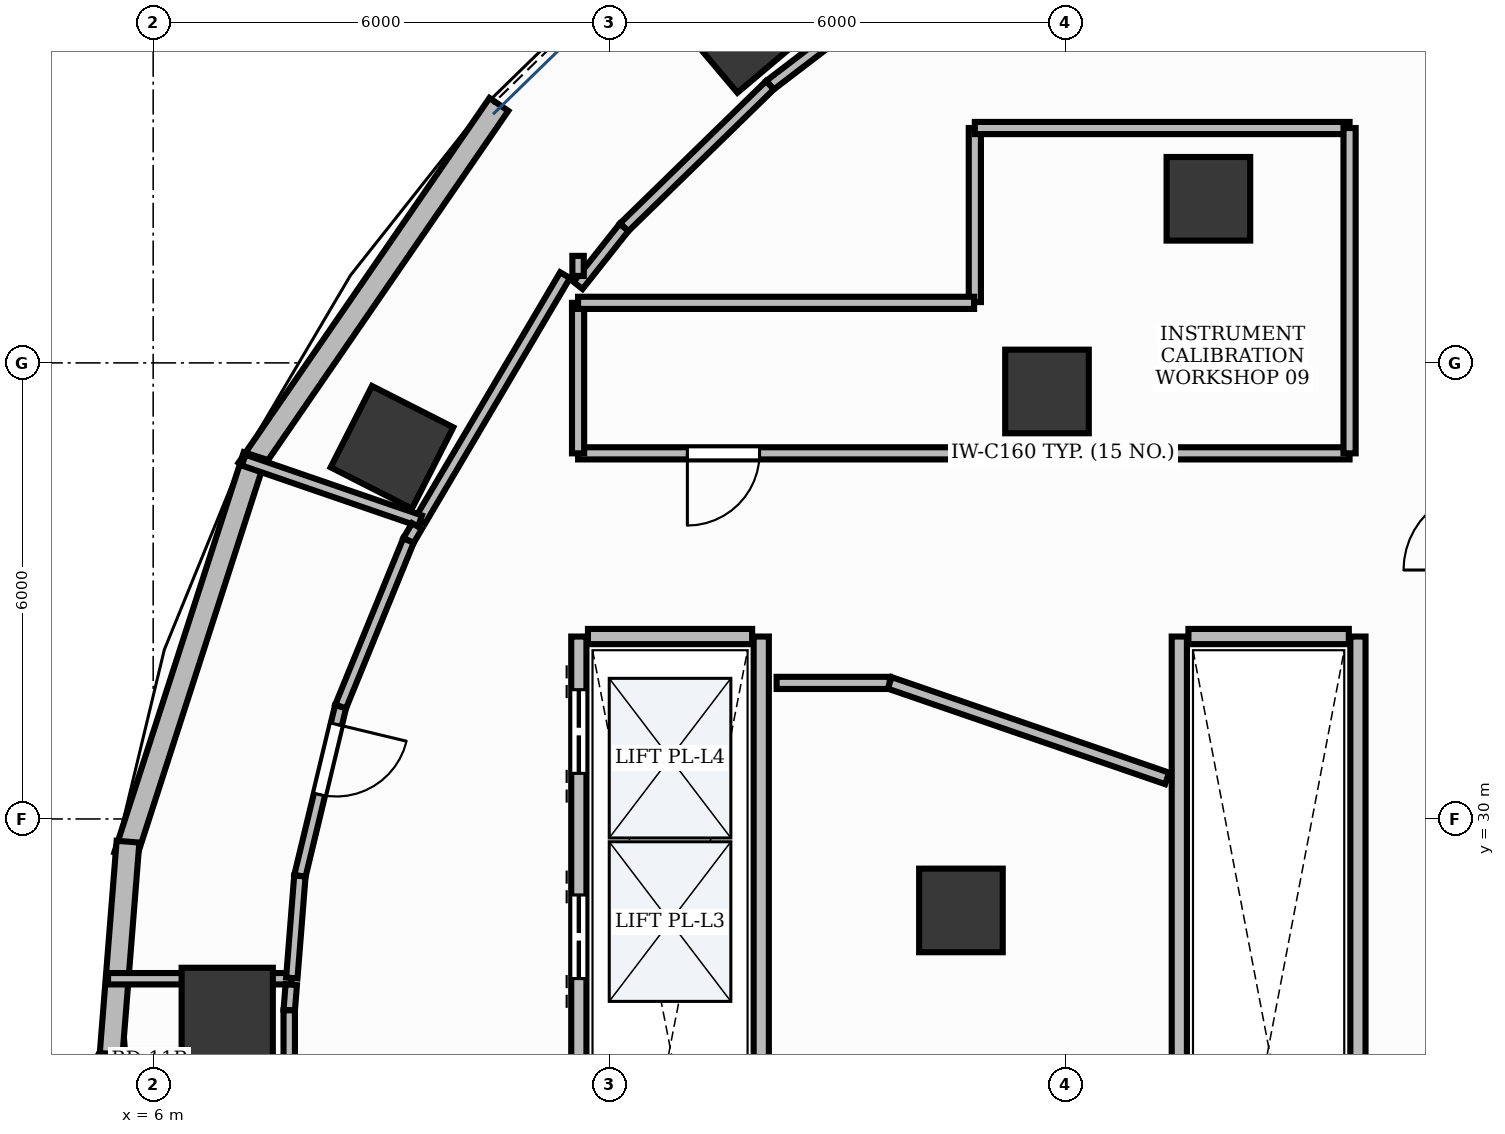
"""IFC4 building model, lengths in metres.
Left out: names, types, materials, properties, quantities, classifications, styles, units other than length and angle.
Written with IfcOpenShell. Run it as: python <this file> out.ifc"""

import sys

from ifc_helpers import new_model, si_unit, direction, frame, frame_2d, origin, origin_2d, place, context, subcontext, project, spatial, rectangle, extrude, element, fill, save


model = new_model("IFC4")
c1 = context("Model", 3, precision=1e-05, world=origin(), true_north=direction((0.0, 1.0)))
c2 = subcontext(c1, "Body", "Model", "MODEL_VIEW")
j1 = project(units=[si_unit("LENGTHUNIT", "METRE"), si_unit("PLANEANGLEUNIT", "RADIAN")], contexts=[c1])
p1 = place(None, origin())
s1 = spatial("IfcSite", under=j1, at=p1, CompositionType="ELEMENT")
p2 = place(p1, origin())
s2 = spatial("IfcBuilding", under=s1, at=p2, CompositionType="ELEMENT")
p3 = place(p2, frame((0.0, 0.0, 123.6)))
s3 = spatial("IfcBuildingStorey", under=s2, at=p3, CompositionType="ELEMENT", Elevation=123.6)
p4 = place(p3, frame((13.758, 40.4, -0.0), z_axis=(0.0, 0.0, 1.0), x_axis=(0.764246456939, 0.644924300253, 0.0)))
e1 = element("IfcColumn", 1, at=p4, inside=s3, PredefinedType="COLUMN", context=c2, shape_type="SweptSolid", body=[
    extrude(rectangle(XDim=1.2, YDim=1.2, at=origin_2d()), origin(), (0.0, 0.0, 1.0), 3.901),
])
p5 = place(p3, frame((19.883, 38.159, -0.0), z_axis=(0.0, 0.0, 1.0), x_axis=(1.0, 0.0, 0.0)))
e2 = element("IfcColumn", 2, at=p5, inside=s3, PredefinedType="COLUMN", context=c2, shape_type="SweptSolid", body=[
    extrude(rectangle(XDim=1.1, YDim=1.1, at=origin_2d()), origin(), (0.0, 0.0, 1.0), 3.901),
])
p6 = place(p3, frame((9.142, 34.889, -0.0), z_axis=(0.0, 0.0, 1.0), x_axis=(0.453057191132, 0.891481453292, 0.0)))
e3 = element("IfcColumn", 3, at=p6, inside=s3, PredefinedType="COLUMN", context=c2, shape_type="SweptSolid", body=[
    extrude(rectangle(XDim=1.2, YDim=1.2, at=origin_2d()), origin(), (0.0, 0.0, 1.0), 3.901),
])
p7 = place(p3, frame((17.759, 35.624, -0.0), z_axis=(0.0, 0.0, 1.0), x_axis=(1.0, 0.0, 0.0)))
e4 = element("IfcColumn", 4, at=p7, inside=s3, PredefinedType="COLUMN", context=c2, shape_type="SweptSolid", body=[
    extrude(rectangle(XDim=1.1, YDim=1.1, at=origin_2d()), origin(), (0.0, 0.0, 1.0), 3.901),
])
p8 = place(p3, frame((6.974, 27.442, -0.0), z_axis=(0.0, 0.0, 1.0), x_axis=(0.0, 1.0, 0.0)))
e5 = element("IfcColumn", 5, at=p8, inside=s3, PredefinedType="COLUMN", context=c2, shape_type="SweptSolid", body=[
    extrude(rectangle(XDim=1.2, YDim=1.2, at=origin_2d()), origin(), (0.0, 0.0, 1.0), 3.901),
])
p9 = place(p3, frame((16.627, 28.797, -0.0), z_axis=(0.0, 0.0, 1.0), x_axis=(1.0, 0.0, 0.0)))
e6 = element("IfcColumn", 6, at=p9, inside=s3, PredefinedType="COLUMN", context=c2, shape_type="SweptSolid", body=[
    extrude(rectangle(XDim=1.1, YDim=1.1, at=origin_2d()), origin(), (0.0, 0.0, 1.0), 3.901),
])
p10 = place(p3, frame((5.469, 27.073, 0.0), z_axis=(0.0, 0.0, 1.0), x_axis=(0.079056321743, -0.996870151019, 0.0)))
e7 = element("IfcWall", 7, at=p10, inside=s3, PredefinedType="STANDARD", context=c2, shape_type="SweptSolid", body=[
    extrude(rectangle(XDim=2.761, YDim=0.3, at=frame_2d((1.38, 0.0))), origin(), (0.0, 0.0, 1.0), 3.9),
])
p11 = place(p10, frame((0.83, 0.0, 0.0)))
e8 = element("IfcOpeningElement", 8, at=p11, cuts=e7, PredefinedType="OPENING", context=c2, shape_type="SweptSolid", body=[
    extrude(rectangle(XDim=1.1, YDim=2.15, at=frame_2d((0.55, 1.075))), frame((0.0, 0.165, 0.0), z_axis=(0.0, -1.0, 0.0), x_axis=(1.0, 0.0, 0.0)), (0.0, 0.0, 1.0), 0.33),
])
p12 = place(p3, frame((10.548, 39.4, 0.0), z_axis=(0.0, 0.0, 1.0), x_axis=(-0.566825798999, -0.823837674296, 0.0)))
e9 = element("IfcWall", 9, at=p12, inside=s3, PredefinedType="STANDARD", context=c2, shape_type="SweptSolid", body=[
    extrude(rectangle(XDim=5.826, YDim=0.3, at=frame_2d((2.913, 0.0))), origin(), (0.0, 0.0, 1.0), 3.47),
])
p13 = place(p3, frame((7.334, 34.779, 0.0), z_axis=(0.0, 0.0, 1.0), x_axis=(-0.307599470659, -0.951515930319, 0.0)))
e10 = element("IfcWall", 10, at=p13, inside=s3, PredefinedType="STANDARD", context=c2, shape_type="SweptSolid", body=[
    extrude(rectangle(XDim=5.534, YDim=0.3, at=frame_2d((2.767, 0.0))), origin(), (0.0, 0.0, 1.0), 3.47),
])
p14 = place(p3, frame((5.669, 29.701, 0.0), z_axis=(0.0, 0.0, 1.0), x_axis=(-0.079062676622, -0.996869647028, 0.0)))
e11 = element("IfcWall", 11, at=p14, inside=s3, PredefinedType="STANDARD", context=c2, shape_type="SweptSolid", body=[
    extrude(rectangle(XDim=2.801, YDim=0.3, at=frame_2d((1.4, 0.0))), origin(), (0.0, 0.0, 1.0), 3.47),
])
p15 = place(p3, frame((11.6, 21.6, 0.0), z_axis=(0.0, 0.0, 1.0), x_axis=(0.0, 1.0, 0.0)))
e12 = element("IfcWall", 12, at=p15, inside=s3, PredefinedType="PARTITIONING", context=c2, shape_type="SweptSolid", body=[
    extrude(rectangle(XDim=10.8, YDim=0.2, at=frame_2d((5.4, 0.0))), origin(), (0.0, 0.0, 1.0), 2.91),
])
p16 = place(p15, frame((0.9, 0.0, 0.0)))
e13 = element("IfcOpeningElement", 13, at=p16, cuts=e12, PredefinedType="OPENING", context=c2, shape_type="SweptSolid", body=[
    extrude(rectangle(XDim=1.1, YDim=2.2, at=frame_2d((0.55, 1.1))), frame((0.0, 0.115, 0.0), z_axis=(0.0, -1.0, 0.0), x_axis=(1.0, 0.0, 0.0)), (0.0, 0.0, 1.0), 0.23),
])
p17 = place(p15, frame((3.6, 0.0, 0.0)))
e14 = element("IfcOpeningElement", 14, at=p17, cuts=e12, PredefinedType="OPENING", context=c2, shape_type="SweptSolid", body=[
    extrude(rectangle(XDim=1.1, YDim=2.2, at=frame_2d((0.55, 1.1))), frame((0.0, 0.115, 0.0), z_axis=(0.0, -1.0, 0.0), x_axis=(1.0, 0.0, 0.0)), (0.0, 0.0, 1.0), 0.23),
])
p18 = place(p15, frame((6.3, 0.0, 0.0)))
e15 = element("IfcOpeningElement", 15, at=p18, cuts=e12, PredefinedType="OPENING", context=c2, shape_type="SweptSolid", body=[
    extrude(rectangle(XDim=1.1, YDim=2.2, at=frame_2d((0.55, 1.1))), frame((0.0, 0.115, 0.0), z_axis=(0.0, -1.0, 0.0), x_axis=(1.0, 0.0, 0.0)), (0.0, 0.0, 1.0), 0.23),
])
p19 = place(p15, frame((9.0, 0.0, 0.0)))
e16 = element("IfcOpeningElement", 16, at=p19, cuts=e12, PredefinedType="OPENING", context=c2, shape_type="SweptSolid", body=[
    extrude(rectangle(XDim=1.1, YDim=2.2, at=frame_2d((0.55, 1.1))), frame((0.0, 0.115, 0.0), z_axis=(0.0, -1.0, 0.0), x_axis=(1.0, 0.0, 0.0)), (0.0, 0.0, 1.0), 0.23),
])
p20 = place(p3, frame((14.0, 21.6, 0.0), z_axis=(0.0, 0.0, 1.0), x_axis=(0.0, 1.0, 0.0)))
e17 = element("IfcWall", 17, at=p20, inside=s3, PredefinedType="PARTITIONING", context=c2, shape_type="SweptSolid", body=[
    extrude(rectangle(XDim=10.8, YDim=0.2, at=frame_2d((5.4, 0.0))), origin(), (0.0, 0.0, 1.0), 2.91),
])
p21 = place(p3, frame((11.72, 32.4, 0.0), z_axis=(0.0, 0.0, 1.0), x_axis=(1.0, 0.0, 0.0)))
e18 = element("IfcWall", 18, at=p21, inside=s3, PredefinedType="PARTITIONING", context=c2, shape_type="SweptSolid", body=[
    extrude(rectangle(XDim=2.16, YDim=0.2, at=frame_2d((1.08, 0.0))), origin(), (0.0, 0.0, 1.0), 2.91),
])
for number, where, z_axis, x_axis in (
    (19, (19.5, 21.6, 0.0), (0.0, 0.0, 1.0), (0.0, 1.0, 0.0)),
    (20, (21.85, 21.6, 0.0), (0.0, 0.0, 1.0), (0.0, 1.0, 0.0)),
):
    element("IfcWall", number, at=place(p3, frame(where, z_axis=z_axis, x_axis=x_axis)), inside=s3, PredefinedType="PARTITIONING", context=c2, shape_type="SweptSolid", body=[
        extrude(rectangle(XDim=10.8, YDim=0.2, at=frame_2d((5.4, 0.0))), origin(), (0.0, 0.0, 1.0), 2.91),
    ])
p22 = place(p3, frame((19.62, 32.4, 0.0), z_axis=(0.0, 0.0, 1.0), x_axis=(1.0, 0.0, 0.0)))
e21 = element("IfcWall", 21, at=p22, inside=s3, PredefinedType="PARTITIONING", context=c2, shape_type="SweptSolid", body=[
    extrude(rectangle(XDim=2.11, YDim=0.2, at=frame_2d((1.055, 0.0))), origin(), (0.0, 0.0, 1.0), 2.91),
])
p23 = place(p3, frame((21.74, 34.81, 0.0), z_axis=(0.0, 0.0, 1.0), x_axis=(-1.0, 0.0, 0.0)))
e22 = element("IfcWall", 22, at=p23, inside=s3, PredefinedType="PARTITIONING", context=c2, shape_type="SweptSolid", body=[
    extrude(rectangle(XDim=10.15, YDim=0.16, at=frame_2d((5.075, 0.0))), origin(), (0.0, 0.0, 1.0), 2.91),
])
p24 = place(p23, frame((7.762, 0.0, 0.0)))
e23 = element("IfcOpeningElement", 23, at=p24, cuts=e22, PredefinedType="OPENING", context=c2, shape_type="SweptSolid", body=[
    extrude(rectangle(XDim=0.95, YDim=2.15, at=frame_2d((0.475, 1.075))), frame((0.0, 0.095, 0.0), z_axis=(0.0, -1.0, 0.0), x_axis=(1.0, 0.0, 0.0)), (0.0, 0.0, 1.0), 0.19),
])
p25 = place(p3, frame((8.466, 31.479, 0.0), z_axis=(0.0, 0.0, 1.0), x_axis=(-0.233675196412, -0.972314713754, 0.0)))
e24 = element("IfcWall", 24, at=p25, inside=s3, PredefinedType="PARTITIONING", context=c2, shape_type="SweptSolid", body=[
    extrude(rectangle(XDim=2.291, YDim=0.15, at=frame_2d((1.146, 0.0))), origin(), (0.0, 0.0, 1.0), 2.91),
])
p26 = place(p25, frame((0.24, 0.0, 0.0)))
e25 = element("IfcOpeningElement", 25, at=p26, cuts=e24, PredefinedType="OPENING", context=c2, shape_type="SweptSolid", body=[
    extrude(rectangle(XDim=0.95, YDim=2.15, at=frame_2d((0.475, 1.075))), frame((0.0, 0.09, 0.0), z_axis=(0.0, -1.0, 0.0), x_axis=(1.0, 0.0, 0.0)), (0.0, 0.0, 1.0), 0.18),
])
p27 = place(p3, frame((14.202, 31.79, 0.0), z_axis=(0.0, 0.0, 1.0), x_axis=(1.0, 0.0, 0.0)))
e26 = element("IfcWall", 26, at=p27, inside=s3, PredefinedType="PARTITIONING", context=c2, shape_type="SweptSolid", body=[
    extrude(rectangle(XDim=1.489, YDim=0.16, at=frame_2d((0.744, 0.0))), origin(), (0.0, 0.0, 1.0), 2.91),
])
p28 = place(p3, frame((15.69, 31.79, 0.0), z_axis=(0.0, 0.0, 1.0), x_axis=(0.945518754025, -0.32556763627, 0.0)))
e27 = element("IfcWall", 27, at=p28, inside=s3, PredefinedType="PARTITIONING", context=c2, shape_type="SweptSolid", body=[
    extrude(rectangle(XDim=3.86, YDim=0.16, at=frame_2d((1.93, 0.0))), origin(), (0.0, 0.0, 1.0), 2.91),
])
p29 = place(p3, frame((5.406, 27.898, 0.0), z_axis=(0.0, 0.0, 1.0), x_axis=(1.0, 0.0, 0.0)))
e28 = element("IfcWall", 28, at=p29, inside=s3, PredefinedType="PARTITIONING", context=c2, shape_type="SweptSolid", body=[
    extrude(rectangle(XDim=2.417, YDim=0.15, at=frame_2d((1.208, 0.0))), origin(), (0.0, 0.0, 1.0), 2.91),
])
p30 = place(p3, frame((7.817, 27.82, 0.0), z_axis=(0.0, 0.0, 1.0), x_axis=(-0.078910750646, -0.996881684771, 0.0)))
e29 = element("IfcWall", 29, at=p30, inside=s3, PredefinedType="PARTITIONING", context=c2, shape_type="SweptSolid", body=[
    extrude(rectangle(XDim=0.337, YDim=0.15, at=frame_2d((0.168, 0.0))), origin(), (0.0, 0.0, 1.0), 2.91),
])
p31 = place(p3, frame((7.79, 27.483, 0.0), z_axis=(0.0, 0.0, 1.0), x_axis=(0.0, -1.0, 0.0)))
e30 = element("IfcWall", 30, at=p31, inside=s3, PredefinedType="PARTITIONING", context=c2, shape_type="SweptSolid", body=[
    extrude(rectangle(XDim=0.966, YDim=0.15, at=frame_2d((0.483, 0.0))), origin(), (0.0, 0.0, 1.0), 2.91),
])
p32 = place(p3, frame((16.339, 41.354, 0.0), z_axis=(0.0, 0.0, 1.0), x_axis=(-0.794513779695, -0.607246122981, 0.0)))
e31 = element("IfcWall", 31, at=p32, inside=s3, PredefinedType="PARTITIONING", context=c2, shape_type="SweptSolid", body=[
    extrude(rectangle(XDim=2.799, YDim=0.15, at=frame_2d((1.399, 0.0))), origin(), (0.0, 0.0, 1.0), 2.91),
])
p33 = place(p3, frame((14.114, 39.653, 0.0), z_axis=(0.0, 0.0, 1.0), x_axis=(-0.716161838398, -0.697934252794, 0.0)))
e32 = element("IfcWall", 32, at=p33, inside=s3, PredefinedType="PARTITIONING", context=c2, shape_type="SweptSolid", body=[
    extrude(rectangle(XDim=2.679, YDim=0.15, at=frame_2d((1.339, 0.0))), origin(), (0.0, 0.0, 1.0), 2.91),
])
p34 = place(p3, frame((12.195, 37.782, 0.0), z_axis=(0.0, 0.0, 1.0), x_axis=(-0.621081637991, -0.783745876513, 0.0)))
e33 = element("IfcWall", 33, at=p34, inside=s3, PredefinedType="PARTITIONING", context=c2, shape_type="SweptSolid", body=[
    extrude(rectangle(XDim=0.974, YDim=0.15, at=frame_2d((0.487, 0.0))), origin(), (0.0, 0.0, 1.0), 2.91),
])
p35 = place(p3, frame((11.59, 37.144, 0.0), z_axis=(0.0, 0.0, 1.0), x_axis=(0.0, 1.0, 0.0)))
e34 = element("IfcWall", 34, at=p35, inside=s3, PredefinedType="PARTITIONING", context=c2, shape_type="SweptSolid", body=[
    extrude(rectangle(XDim=0.264, YDim=0.15, at=frame_2d((0.132, 0.0))), origin(), (0.0, 0.0, 1.0), 2.91),
])
p36 = place(p3, frame((11.419, 37.154, 0.0), z_axis=(0.0, 0.0, 1.0), x_axis=(-0.508216412194, -0.861229399392, 0.0)))
e35 = element("IfcWall", 35, at=p36, inside=s3, PredefinedType="PARTITIONING", context=c2, shape_type="SweptSolid", body=[
    extrude(rectangle(XDim=3.753, YDim=0.15, at=frame_2d((1.876, 0.0))), origin(), (0.0, 0.0, 1.0), 2.91),
])
p37 = place(p3, frame((9.511, 33.922, 0.0), z_axis=(0.0, 0.0, 1.0), x_axis=(-0.945502944909, 0.325613545737, 0.0)))
e36 = element("IfcWall", 36, at=p37, inside=s3, PredefinedType="PARTITIONING", context=c2, shape_type="SweptSolid", body=[
    extrude(rectangle(XDim=2.454, YDim=0.15, at=frame_2d((1.227, 0.0))), origin(), (0.0, 0.0, 1.0), 2.91),
])
p38 = place(p3, frame((16.81, 36.8, 0.0), z_axis=(0.0, 0.0, 1.0), x_axis=(0.0, 1.0, 0.0)))
e37 = element("IfcWall", 37, at=p38, inside=s3, PredefinedType="PARTITIONING", context=c2, shape_type="SweptSolid", body=[
    extrude(rectangle(XDim=2.29, YDim=0.16, at=frame_2d((1.145, 0.0))), origin(), (0.0, 0.0, 1.0), 2.91),
])
p39 = place(p3, frame((16.81, 39.09, 0.0), z_axis=(0.0, 0.0, 1.0), x_axis=(1.0, 0.0, 0.0)))
e38 = element("IfcWall", 38, at=p39, inside=s3, PredefinedType="PARTITIONING", context=c2, shape_type="SweptSolid", body=[
    extrude(rectangle(XDim=4.93, YDim=0.16, at=frame_2d((2.465, 0.0))), origin(), (0.0, 0.0, 1.0), 2.91),
])
p40 = place(p3, frame((21.74, 39.09, 0.0), z_axis=(0.0, 0.0, 1.0), x_axis=(0.0, -1.0, 0.0)))
e39 = element("IfcWall", 39, at=p40, inside=s3, PredefinedType="PARTITIONING", context=c2, shape_type="SweptSolid", body=[
    extrude(rectangle(XDim=4.28, YDim=0.16, at=frame_2d((2.14, 0.0))), origin(), (0.0, 0.0, 1.0), 2.91),
])
p41 = place(p3, frame((11.59, 34.81, 0.0), z_axis=(0.0, 0.0, 1.0), x_axis=(0.0, 1.0, 0.0)))
e40 = element("IfcWall", 40, at=p41, inside=s3, PredefinedType="PARTITIONING", context=c2, shape_type="SweptSolid", body=[
    extrude(rectangle(XDim=1.98, YDim=0.16, at=frame_2d((0.99, 0.0))), origin(), (0.0, 0.0, 1.0), 2.91),
])
p42 = place(p3, frame((11.59, 36.79, 0.0), z_axis=(0.0, 0.0, 1.0), x_axis=(1.0, 0.0, 0.0)))
e41 = element("IfcWall", 41, at=p42, inside=s3, PredefinedType="PARTITIONING", context=c2, shape_type="SweptSolid", body=[
    extrude(rectangle(XDim=5.21, YDim=0.16, at=frame_2d((2.605, 0.0))), origin(), (0.0, 0.0, 1.0), 2.91),
])
p43 = place(p3, frame((9.471, 33.853, 0.0), z_axis=(0.0, 0.0, 1.0), x_axis=(-0.507456803225, -0.861677197598, 0.0)))
e42 = element("IfcWall", 42, at=p43, inside=s3, PredefinedType="PARTITIONING", context=c2, shape_type="SweptSolid", body=[
    extrude(rectangle(XDim=0.22, YDim=0.15, at=frame_2d((0.11, 0.0))), origin(), (0.0, 0.0, 1.0), 2.91),
])
p44 = place(p3, frame((9.358, 33.663, 0.0), z_axis=(0.0, 0.0, 1.0), x_axis=(-0.378306283753, -0.925680482495, 0.0)))
e43 = element("IfcWall", 43, at=p44, inside=s3, PredefinedType="PARTITIONING", context=c2, shape_type="SweptSolid", body=[
    extrude(rectangle(XDim=2.358, YDim=0.15, at=frame_2d((1.179, 0.0))), origin(), (0.0, 0.0, 1.0), 2.91),
])
p45 = place(p3, frame((7.93, 29.249, 0.0), z_axis=(0.0, 0.0, 1.0), x_axis=(-0.079110576853, -0.996865846857, 0.0)))
e44 = element("IfcWall", 44, at=p45, inside=s3, PredefinedType="PARTITIONING", context=c2, shape_type="SweptSolid", body=[
    extrude(rectangle(XDim=1.345, YDim=0.15, at=frame_2d((0.673, 0.0))), origin(), (0.0, 0.0, 1.0), 2.91),
])
p46 = place(p18, origin())
e45 = element("IfcDoor", 45, at=p46, inside=s3, OperationType="DOUBLE_DOOR_SLIDING", PredefinedType="DOOR", context=c2, shape_type="SweptSolid", body=[
    extrude(rectangle(XDim=1.1, YDim=2.2, at=frame_2d((0.55, 1.1))), frame((0.0, 0.025, 0.0), z_axis=(0.0, -1.0, 0.0), x_axis=(1.0, 0.0, 0.0)), (0.0, 0.0, 1.0), 0.05),
])
fill(e15, e45)
p47 = place(p19, origin())
e46 = element("IfcDoor", 46, at=p47, inside=s3, OperationType="DOUBLE_DOOR_SLIDING", PredefinedType="DOOR", context=c2, shape_type="SweptSolid", body=[
    extrude(rectangle(XDim=1.1, YDim=2.2, at=frame_2d((0.55, 1.1))), frame((0.0, 0.025, 0.0), z_axis=(0.0, -1.0, 0.0), x_axis=(1.0, 0.0, 0.0)), (0.0, 0.0, 1.0), 0.05),
])
fill(e16, e46)
p48 = place(p24, origin())
e47 = element("IfcDoor", 47, at=p48, inside=s3, OperationType="SINGLE_SWING_RIGHT", PredefinedType="DOOR", context=c2, shape_type="SweptSolid", body=[
    extrude(rectangle(XDim=0.95, YDim=2.15, at=frame_2d((0.475, 1.075))), frame((0.0, 0.025, 0.0), z_axis=(0.0, -1.0, 0.0), x_axis=(1.0, 0.0, 0.0)), (0.0, 0.0, 1.0), 0.05),
])
fill(e23, e47)
p49 = place(p26, origin())
e48 = element("IfcDoor", 48, at=p49, inside=s3, OperationType="SINGLE_SWING_LEFT", PredefinedType="DOOR", context=c2, shape_type="SweptSolid", body=[
    extrude(rectangle(XDim=0.95, YDim=2.15, at=frame_2d((0.475, 1.075))), frame((0.0, 0.025, 0.0), z_axis=(0.0, -1.0, 0.0), x_axis=(1.0, 0.0, 0.0)), (0.0, 0.0, 1.0), 0.05),
])
fill(e25, e48)
save(model, sys.argv[1])
